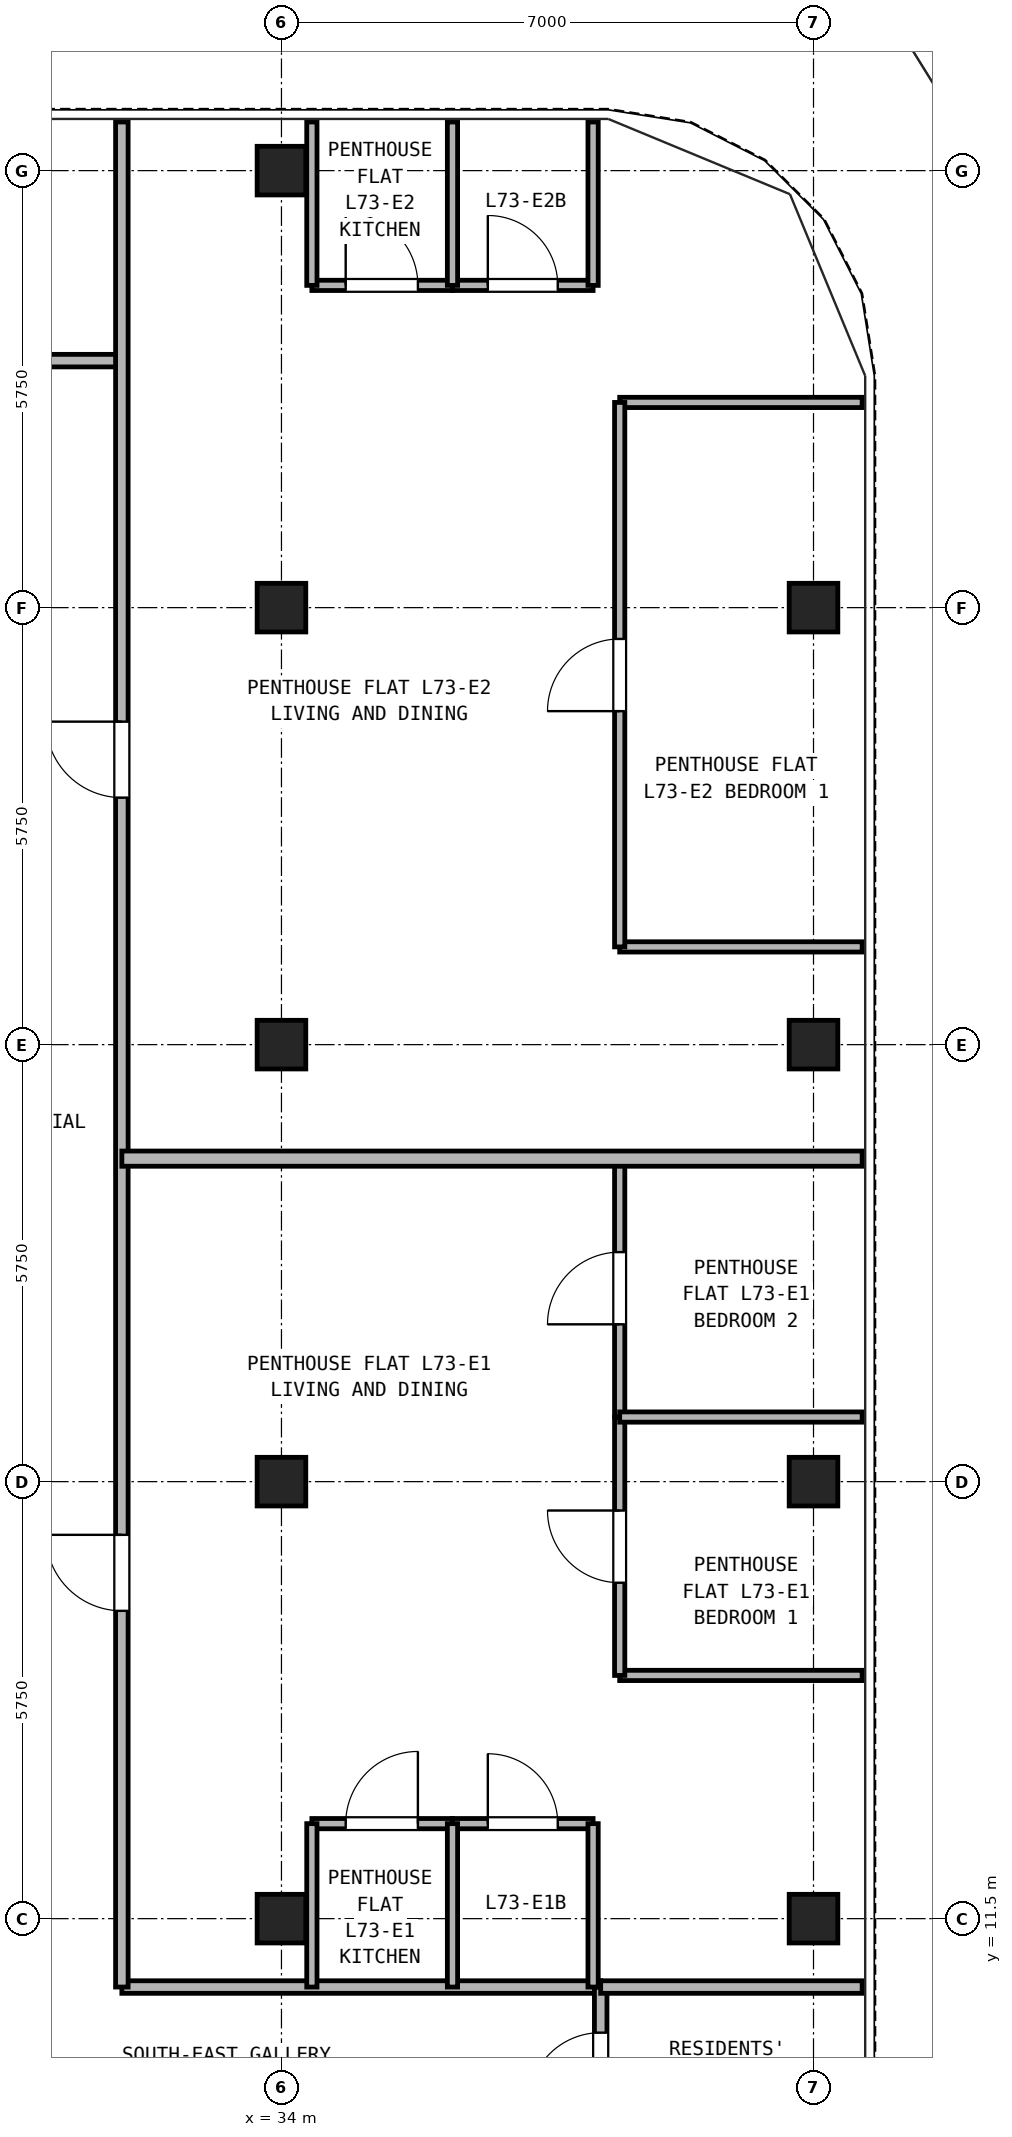
"""IFC4 building model, lengths in metres.
Left out: names, types, materials, properties, quantities, classifications, styles, units other than length and angle.
Written with IfcOpenShell. Run it as: python <this file> out.ifc"""

import sys

from ifc_helpers import new_model, si_unit, direction, frame, frame_2d, origin, origin_2d, place, context, subcontext, project, spatial, rectangle, hollow_rectangle, extrude, source, transform, mapped, element, fill, save


model = new_model("IFC4")
c1 = context("Model", 3, precision=1e-05, world=origin(), true_north=direction((0.0, 1.0)))
c2 = subcontext(c1, "Body", "Model", "MODEL_VIEW")
j1 = project(units=[si_unit("LENGTHUNIT", "METRE"), si_unit("PLANEANGLEUNIT", "RADIAN")], contexts=[c1])
p1 = place(None, origin())
s1 = spatial("IfcSite", under=j1, at=p1, CompositionType="ELEMENT")
p2 = place(p1, origin())
s2 = spatial("IfcBuilding", under=s1, at=p2, CompositionType="ELEMENT")
p3 = place(p2, frame((0.0, 0.0, 255.3)))
s3 = spatial("IfcBuildingStorey", under=s2, at=p3, CompositionType="ELEMENT", Elevation=255.3)
m1 = source(origin(), c2, "Body", "SweptSolid", [
    extrude(hollow_rectangle(XDim=0.64, YDim=0.64, WallThickness=0.035, at=origin_2d()), origin(), (0.0, 0.0, 1.0), 2.98),
])
for number, where, z_axis, x_axis in (
    (1, (34.0, 34.5, 0.0), (0.0, 0.0, 1.0), (1.0, 0.0, 0.0)),
    (2, (41.0, 11.5, 0.0), (0.0, 0.0, 1.0), (1.0, 0.0, 0.0)),
    (3, (41.0, 17.25, 0.0), (0.0, 0.0, 1.0), (1.0, 0.0, 0.0)),
    (4, (41.0, 23.0, 0.0), (0.0, 0.0, 1.0), (1.0, 0.0, 0.0)),
    (5, (41.0, 28.75, 0.0), (0.0, 0.0, 1.0), (1.0, 0.0, 0.0)),
    (6, (34.0, 11.5, 0.0), (0.0, 0.0, 1.0), (1.0, 0.0, 0.0)),
    (7, (34.0, 17.25, 0.0), (0.0, 0.0, 1.0), (1.0, 0.0, 0.0)),
    (8, (34.0, 23.0, 0.0), (0.0, 0.0, 1.0), (1.0, 0.0, 0.0)),
    (9, (34.0, 28.75, 0.0), (0.0, 0.0, 1.0), (1.0, 0.0, 0.0)),
):
    element("IfcColumn", number, at=place(p3, frame(where, z_axis=z_axis, x_axis=x_axis)), inside=s3, PredefinedType="COLUMN", context=c2, shape_type="MappedRepresentation", body=[
        mapped(m1, transform((0.0, 0.0, 0.0), x_axis=(1.0, 0.0, 0.0), y_axis=(0.0, 1.0, 0.0), z_axis=(0.0, 0.0, 1.0), scale=1.0)),
    ])
p4 = place(p3, frame((31.9, 10.6, 0.0), z_axis=(0.0, 0.0, 1.0), x_axis=(1.0, 0.0, 0.0)))
e10 = element("IfcWall", 10, at=p4, inside=s3, PredefinedType="PARTITIONING", context=c2, shape_type="SweptSolid", body=[
    extrude(rectangle(XDim=6.3, YDim=0.165, at=frame_2d((3.15, 0.0))), origin(), (0.0, 0.0, 1.0), 2.98),
])
p5 = place(p3, frame((38.2, 8.6, 0.0), z_axis=(0.0, 0.0, 1.0), x_axis=(0.0, 1.0, 0.0)))
e11 = element("IfcWall", 11, at=p5, inside=s3, PredefinedType="PARTITIONING", context=c2, shape_type="SweptSolid", body=[
    extrude(rectangle(XDim=2.0, YDim=0.165, at=frame_2d((1.0, 0.0))), origin(), (0.0, 0.0, 1.0), 2.98),
])
p6 = place(p5, frame((0.45, 0.0, 0.0)))
e12 = element("IfcOpeningElement", 12, at=p6, cuts=e11, PredefinedType="OPENING", context=c2, shape_type="SweptSolid", body=[
    extrude(rectangle(XDim=0.95, YDim=2.15, at=frame_2d((0.475, 1.075))), frame((0.0, 0.093, 0.0), z_axis=(0.0, -1.0, 0.0), x_axis=(1.0, 0.0, 0.0)), (0.0, 0.0, 1.0), 0.185),
])
p7 = place(p3, frame((15.1, 32.0, 0.0), z_axis=(0.0, 0.0, 1.0), x_axis=(1.0, 0.0, 0.0)))
e13 = element("IfcWall", 13, at=p7, inside=s3, PredefinedType="PARTITIONING", context=c2, shape_type="SweptSolid", body=[
    extrude(rectangle(XDim=16.8, YDim=0.165, at=frame_2d((8.4, 0.0))), origin(), (0.0, 0.0, 1.0), 2.98),
])
p8 = place(p7, frame((2.7, 0.0, 0.0)))
e14 = element("IfcOpeningElement", 14, at=p8, cuts=e13, PredefinedType="OPENING", context=c2, shape_type="SweptSolid", body=[
    extrude(rectangle(XDim=0.95, YDim=2.15, at=frame_2d((0.475, 1.075))), frame((0.0, 0.093, 0.0), z_axis=(0.0, -1.0, 0.0), x_axis=(1.0, 0.0, 0.0)), (0.0, 0.0, 1.0), 0.185),
])
p9 = place(p7, frame((8.1, 0.0, 0.0)))
e15 = element("IfcOpeningElement", 15, at=p9, cuts=e13, PredefinedType="OPENING", context=c2, shape_type="SweptSolid", body=[
    extrude(rectangle(XDim=0.95, YDim=2.15, at=frame_2d((0.475, 1.075))), frame((0.0, 0.093, 0.0), z_axis=(0.0, -1.0, 0.0), x_axis=(1.0, 0.0, 0.0)), (0.0, 0.0, 1.0), 0.185),
])
p10 = place(p7, frame((13.3, 0.0, 0.0)))
e16 = element("IfcOpeningElement", 16, at=p10, cuts=e13, PredefinedType="OPENING", context=c2, shape_type="SweptSolid", body=[
    extrude(rectangle(XDim=0.92, YDim=2.1, at=frame_2d((0.46, 1.05))), frame((0.0, 0.093, 0.0), z_axis=(0.0, -1.0, 0.0), x_axis=(1.0, 0.0, 0.0)), (0.0, 0.0, 1.0), 0.185),
])
p11 = place(p3, frame((31.9, 10.6, 0.0), z_axis=(0.0, 0.0, 1.0), x_axis=(0.0, 1.0, 0.0)))
e17 = element("IfcWall", 17, at=p11, inside=s3, PredefinedType="PARTITIONING", context=c2, shape_type="SweptSolid", body=[
    extrude(rectangle(XDim=24.54, YDim=0.165, at=frame_2d((12.27, 0.0))), origin(), (0.0, 0.0, 1.0), 2.98),
])
p12 = place(p11, frame((4.95, 0.0, 0.0)))
e18 = element("IfcOpeningElement", 18, at=p12, cuts=e17, PredefinedType="OPENING", context=c2, shape_type="SweptSolid", body=[
    extrude(rectangle(XDim=1.0, YDim=2.15, at=frame_2d((0.5, 1.075))), frame((0.0, 0.093, 0.0), z_axis=(0.0, -1.0, 0.0), x_axis=(1.0, 0.0, 0.0)), (0.0, 0.0, 1.0), 0.185),
])
p13 = place(p11, frame((15.65, 0.0, 0.0)))
e19 = element("IfcOpeningElement", 19, at=p13, cuts=e17, PredefinedType="OPENING", context=c2, shape_type="SweptSolid", body=[
    extrude(rectangle(XDim=1.0, YDim=2.15, at=frame_2d((0.5, 1.075))), frame((0.0, 0.093, 0.0), z_axis=(0.0, -1.0, 0.0), x_axis=(1.0, 0.0, 0.0)), (0.0, 0.0, 1.0), 0.185),
])
p14 = place(p3, frame((38.2, 10.6, 0.0), z_axis=(0.0, 0.0, 1.0), x_axis=(1.0, 0.0, 0.0)))
e20 = element("IfcWall", 20, at=p14, inside=s3, PredefinedType="PARTITIONING", context=c2, shape_type="SweptSolid", body=[
    extrude(rectangle(XDim=3.44, YDim=0.165, at=frame_2d((1.72, 0.0))), origin(), (0.0, 0.0, 1.0), 2.98),
])
p15 = place(p3, frame((34.4, 12.75, 0.0), z_axis=(0.0, 0.0, 1.0), x_axis=(1.0, 0.0, 0.0)))
e21 = element("IfcWall", 21, at=p15, inside=s3, PredefinedType="PARTITIONING", context=c2, shape_type="SweptSolid", body=[
    extrude(rectangle(XDim=1.85, YDim=0.135, at=frame_2d((0.925, 0.0))), origin(), (0.0, 0.0, 1.0), 2.98),
])
p16 = place(p15, frame((0.445, 0.0, 0.0)))
e22 = element("IfcOpeningElement", 22, at=p16, cuts=e21, PredefinedType="OPENING", context=c2, shape_type="SweptSolid", body=[
    extrude(rectangle(XDim=0.95, YDim=2.15, at=frame_2d((0.475, 1.075))), frame((0.0, 0.077, 0.0), z_axis=(0.0, -1.0, 0.0), x_axis=(1.0, 0.0, 0.0)), (0.0, 0.0, 1.0), 0.155),
])
p17 = place(p3, frame((36.25, 12.75, 0.0), z_axis=(0.0, 0.0, 1.0), x_axis=(1.0, 0.0, 0.0)))
e23 = element("IfcWall", 23, at=p17, inside=s3, PredefinedType="PARTITIONING", context=c2, shape_type="SweptSolid", body=[
    extrude(rectangle(XDim=1.85, YDim=0.135, at=frame_2d((0.925, 0.0))), origin(), (0.0, 0.0, 1.0), 2.98),
])
p18 = place(p17, frame((0.465, 0.0, 0.0)))
e24 = element("IfcOpeningElement", 24, at=p18, cuts=e23, PredefinedType="OPENING", context=c2, shape_type="SweptSolid", body=[
    extrude(rectangle(XDim=0.92, YDim=2.1, at=frame_2d((0.46, 1.05))), frame((0.0, 0.077, 0.0), z_axis=(0.0, -1.0, 0.0), x_axis=(1.0, 0.0, 0.0)), (0.0, 0.0, 1.0), 0.155),
])
for number, where, z_axis, x_axis in (
    (25, (34.4, 10.6, 0.0), (0.0, 0.0, 1.0), (0.0, 1.0, 0.0)),
    (26, (36.25, 10.6, 0.0), (0.0, 0.0, 1.0), (0.0, 1.0, 0.0)),
    (27, (38.1, 10.6, 0.0), (0.0, 0.0, 1.0), (0.0, 1.0, 0.0)),
):
    element("IfcWall", number, at=place(p3, frame(where, z_axis=z_axis, x_axis=x_axis)), inside=s3, PredefinedType="PARTITIONING", context=c2, shape_type="SweptSolid", body=[
        extrude(rectangle(XDim=2.15, YDim=0.135, at=frame_2d((1.075, 0.0))), origin(), (0.0, 0.0, 1.0), 2.98),
    ])
p19 = place(p3, frame((38.45, 14.7, 0.0), z_axis=(0.0, 0.0, 1.0), x_axis=(1.0, 0.0, 0.0)))
e28 = element("IfcWall", 28, at=p19, inside=s3, PredefinedType="PARTITIONING", context=c2, shape_type="SweptSolid", body=[
    extrude(rectangle(XDim=3.19, YDim=0.135, at=frame_2d((1.595, 0.0))), origin(), (0.0, 0.0, 1.0), 2.98),
])
p20 = place(p3, frame((38.45, 14.7, 0.0), z_axis=(0.0, 0.0, 1.0), x_axis=(0.0, 1.0, 0.0)))
e29 = element("IfcWall", 29, at=p20, inside=s3, PredefinedType="PARTITIONING", context=c2, shape_type="SweptSolid", body=[
    extrude(rectangle(XDim=3.4, YDim=0.135, at=frame_2d((1.7, 0.0))), origin(), (0.0, 0.0, 1.0), 2.98),
])
p21 = place(p20, frame((1.22, 0.0, 0.0)))
e30 = element("IfcOpeningElement", 30, at=p21, cuts=e29, PredefinedType="OPENING", context=c2, shape_type="SweptSolid", body=[
    extrude(rectangle(XDim=0.95, YDim=2.15, at=frame_2d((0.475, 1.075))), frame((0.0, 0.077, 0.0), z_axis=(0.0, -1.0, 0.0), x_axis=(1.0, 0.0, 0.0)), (0.0, 0.0, 1.0), 0.155),
])
p22 = place(p3, frame((38.45, 18.1, 0.0), z_axis=(0.0, 0.0, 1.0), x_axis=(0.0, 1.0, 0.0)))
e31 = element("IfcWall", 31, at=p22, inside=s3, PredefinedType="PARTITIONING", context=c2, shape_type="SweptSolid", body=[
    extrude(rectangle(XDim=3.4, YDim=0.135, at=frame_2d((1.7, 0.0))), origin(), (0.0, 0.0, 1.0), 2.98),
])
p23 = place(p22, frame((1.22, 0.0, 0.0)))
e32 = element("IfcOpeningElement", 32, at=p23, cuts=e31, PredefinedType="OPENING", context=c2, shape_type="SweptSolid", body=[
    extrude(rectangle(XDim=0.95, YDim=2.15, at=frame_2d((0.475, 1.075))), frame((0.0, 0.077, 0.0), z_axis=(0.0, -1.0, 0.0), x_axis=(1.0, 0.0, 0.0)), (0.0, 0.0, 1.0), 0.155),
])
p24 = place(p3, frame((38.45, 18.1, 0.0), z_axis=(0.0, 0.0, 1.0), x_axis=(1.0, 0.0, 0.0)))
e33 = element("IfcWall", 33, at=p24, inside=s3, PredefinedType="PARTITIONING", context=c2, shape_type="SweptSolid", body=[
    extrude(rectangle(XDim=3.19, YDim=0.135, at=frame_2d((1.595, 0.0))), origin(), (0.0, 0.0, 1.0), 2.98),
])
p25 = place(p3, frame((31.9, 21.5, 0.0), z_axis=(0.0, 0.0, 1.0), x_axis=(1.0, 0.0, 0.0)))
e34 = element("IfcWall", 34, at=p25, inside=s3, PredefinedType="PARTITIONING", context=c2, shape_type="SweptSolid", body=[
    extrude(rectangle(XDim=9.74, YDim=0.2, at=frame_2d((4.87, 0.0))), origin(), (0.0, 0.0, 1.0), 2.98),
])
p26 = place(p3, frame((34.4, 32.99, 0.0), z_axis=(0.0, 0.0, 1.0), x_axis=(1.0, 0.0, 0.0)))
e35 = element("IfcWall", 35, at=p26, inside=s3, PredefinedType="PARTITIONING", context=c2, shape_type="SweptSolid", body=[
    extrude(rectangle(XDim=1.85, YDim=0.135, at=frame_2d((0.925, 0.0))), origin(), (0.0, 0.0, 1.0), 2.98),
])
p27 = place(p26, frame((0.445, 0.0, 0.0)))
e36 = element("IfcOpeningElement", 36, at=p27, cuts=e35, PredefinedType="OPENING", context=c2, shape_type="SweptSolid", body=[
    extrude(rectangle(XDim=0.95, YDim=2.15, at=frame_2d((0.475, 1.075))), frame((0.0, 0.077, 0.0), z_axis=(0.0, -1.0, 0.0), x_axis=(1.0, 0.0, 0.0)), (0.0, 0.0, 1.0), 0.155),
])
p28 = place(p3, frame((36.25, 32.99, 0.0), z_axis=(0.0, 0.0, 1.0), x_axis=(1.0, 0.0, 0.0)))
e37 = element("IfcWall", 37, at=p28, inside=s3, PredefinedType="PARTITIONING", context=c2, shape_type="SweptSolid", body=[
    extrude(rectangle(XDim=1.85, YDim=0.135, at=frame_2d((0.925, 0.0))), origin(), (0.0, 0.0, 1.0), 2.98),
])
p29 = place(p28, frame((0.465, 0.0, 0.0)))
e38 = element("IfcOpeningElement", 38, at=p29, cuts=e37, PredefinedType="OPENING", context=c2, shape_type="SweptSolid", body=[
    extrude(rectangle(XDim=0.92, YDim=2.1, at=frame_2d((0.46, 1.05))), frame((0.0, 0.077, 0.0), z_axis=(0.0, -1.0, 0.0), x_axis=(1.0, 0.0, 0.0)), (0.0, 0.0, 1.0), 0.155),
])
for number, where, z_axis, x_axis in (
    (39, (34.4, 32.99, 0.0), (0.0, 0.0, 1.0), (0.0, 1.0, 0.0)),
    (40, (36.25, 32.99, 0.0), (0.0, 0.0, 1.0), (0.0, 1.0, 0.0)),
    (41, (38.1, 32.99, 0.0), (0.0, 0.0, 1.0), (0.0, 1.0, 0.0)),
):
    element("IfcWall", number, at=place(p3, frame(where, z_axis=z_axis, x_axis=x_axis)), inside=s3, PredefinedType="PARTITIONING", context=c2, shape_type="SweptSolid", body=[
        extrude(rectangle(XDim=2.15, YDim=0.135, at=frame_2d((1.075, 0.0))), origin(), (0.0, 0.0, 1.0), 2.98),
    ])
for number, where, z_axis, x_axis in (
    (42, (38.45, 24.286, 0.0), (0.0, 0.0, 1.0), (1.0, 0.0, 0.0)),
    (43, (38.45, 31.45, 0.0), (0.0, 0.0, 1.0), (1.0, 0.0, 0.0)),
):
    element("IfcWall", number, at=place(p3, frame(where, z_axis=z_axis, x_axis=x_axis)), inside=s3, PredefinedType="PARTITIONING", context=c2, shape_type="SweptSolid", body=[
        extrude(rectangle(XDim=3.19, YDim=0.135, at=frame_2d((1.595, 0.0))), origin(), (0.0, 0.0, 1.0), 2.98),
    ])
p30 = place(p3, frame((38.45, 24.286, 0.0), z_axis=(0.0, 0.0, 1.0), x_axis=(0.0, 1.0, 0.0)))
e44 = element("IfcWall", 44, at=p30, inside=s3, PredefinedType="PARTITIONING", context=c2, shape_type="SweptSolid", body=[
    extrude(rectangle(XDim=7.164, YDim=0.135, at=frame_2d((3.582, 0.0))), origin(), (0.0, 0.0, 1.0), 2.98),
])
p31 = place(p30, frame((3.102, 0.0, 0.0)))
e45 = element("IfcOpeningElement", 45, at=p31, cuts=e44, PredefinedType="OPENING", context=c2, shape_type="SweptSolid", body=[
    extrude(rectangle(XDim=0.95, YDim=2.15, at=frame_2d((0.475, 1.075))), frame((0.0, 0.077, 0.0), z_axis=(0.0, -1.0, 0.0), x_axis=(1.0, 0.0, 0.0)), (0.0, 0.0, 1.0), 0.155),
])
p32 = place(p6, origin())
e46 = element("IfcDoor", 46, at=p32, inside=s3, OperationType="SINGLE_SWING_LEFT", PredefinedType="DOOR", context=c2, shape_type="SweptSolid", body=[
    extrude(rectangle(XDim=0.95, YDim=2.15, at=frame_2d((0.475, 1.075))), frame((0.0, 0.025, 0.0), z_axis=(0.0, -1.0, 0.0), x_axis=(1.0, 0.0, 0.0)), (0.0, 0.0, 1.0), 0.05),
])
fill(e12, e46)
p33 = place(p16, origin())
e47 = element("IfcDoor", 47, at=p33, inside=s3, OperationType="SINGLE_SWING_RIGHT", PredefinedType="DOOR", context=c2, shape_type="SweptSolid", body=[
    extrude(rectangle(XDim=0.95, YDim=2.15, at=frame_2d((0.475, 1.075))), frame((0.0, 0.025, 0.0), z_axis=(0.0, -1.0, 0.0), x_axis=(1.0, 0.0, 0.0)), (0.0, 0.0, 1.0), 0.05),
])
fill(e22, e47)
p34 = place(p18, origin())
e48 = element("IfcDoor", 48, at=p34, inside=s3, OperationType="SINGLE_SWING_LEFT", PredefinedType="DOOR", context=c2, shape_type="SweptSolid", body=[
    extrude(rectangle(XDim=0.92, YDim=2.1, at=frame_2d((0.46, 1.05))), frame((0.0, 0.025, 0.0), z_axis=(0.0, -1.0, 0.0), x_axis=(1.0, 0.0, 0.0)), (0.0, 0.0, 1.0), 0.05),
])
fill(e24, e48)
p35 = place(p21, frame((0.95, 0.0, 0.0), z_axis=(0.0, 0.0, 1.0), x_axis=(-1.0, 0.0, 0.0)))
e49 = element("IfcDoor", 49, at=p35, inside=s3, OperationType="SINGLE_SWING_RIGHT", PredefinedType="DOOR", context=c2, shape_type="SweptSolid", body=[
    extrude(rectangle(XDim=0.95, YDim=2.15, at=frame_2d((0.475, 1.075))), frame((0.0, 0.025, 0.0), z_axis=(0.0, -1.0, 0.0), x_axis=(1.0, 0.0, 0.0)), (0.0, 0.0, 1.0), 0.05),
])
fill(e30, e49)
p36 = place(p23, frame((0.95, 0.0, 0.0), z_axis=(0.0, 0.0, 1.0), x_axis=(-1.0, 0.0, 0.0)))
e50 = element("IfcDoor", 50, at=p36, inside=s3, OperationType="SINGLE_SWING_LEFT", PredefinedType="DOOR", context=c2, shape_type="SweptSolid", body=[
    extrude(rectangle(XDim=0.95, YDim=2.15, at=frame_2d((0.475, 1.075))), frame((0.0, 0.025, 0.0), z_axis=(0.0, -1.0, 0.0), x_axis=(1.0, 0.0, 0.0)), (0.0, 0.0, 1.0), 0.05),
])
fill(e32, e50)
p37 = place(p12, frame((1.0, 0.0, 0.0), z_axis=(0.0, 0.0, 1.0), x_axis=(-1.0, 0.0, 0.0)))
e51 = element("IfcDoor", 51, at=p37, inside=s3, OperationType="SINGLE_SWING_RIGHT", PredefinedType="DOOR", context=c2, shape_type="SweptSolid", body=[
    extrude(rectangle(XDim=1.0, YDim=2.15, at=frame_2d((0.5, 1.075))), frame((0.0, 0.025, 0.0), z_axis=(0.0, -1.0, 0.0), x_axis=(1.0, 0.0, 0.0)), (0.0, 0.0, 1.0), 0.05),
])
fill(e18, e51)
p38 = place(p27, frame((0.95, 0.0, 0.0), z_axis=(0.0, 0.0, 1.0), x_axis=(-1.0, 0.0, 0.0)))
e52 = element("IfcDoor", 52, at=p38, inside=s3, OperationType="SINGLE_SWING_LEFT", PredefinedType="DOOR", context=c2, shape_type="SweptSolid", body=[
    extrude(rectangle(XDim=0.95, YDim=2.15, at=frame_2d((0.475, 1.075))), frame((0.0, 0.025, 0.0), z_axis=(0.0, -1.0, 0.0), x_axis=(1.0, 0.0, 0.0)), (0.0, 0.0, 1.0), 0.05),
])
fill(e36, e52)
p39 = place(p29, frame((0.92, 0.0, 0.0), z_axis=(0.0, 0.0, 1.0), x_axis=(-1.0, 0.0, 0.0)))
e53 = element("IfcDoor", 53, at=p39, inside=s3, OperationType="SINGLE_SWING_LEFT", PredefinedType="DOOR", context=c2, shape_type="SweptSolid", body=[
    extrude(rectangle(XDim=0.92, YDim=2.1, at=frame_2d((0.46, 1.05))), frame((0.0, 0.025, 0.0), z_axis=(0.0, -1.0, 0.0), x_axis=(1.0, 0.0, 0.0)), (0.0, 0.0, 1.0), 0.05),
])
fill(e38, e53)
p40 = place(p31, frame((0.95, 0.0, 0.0), z_axis=(0.0, 0.0, 1.0), x_axis=(-1.0, 0.0, 0.0)))
e54 = element("IfcDoor", 54, at=p40, inside=s3, OperationType="SINGLE_SWING_LEFT", PredefinedType="DOOR", context=c2, shape_type="SweptSolid", body=[
    extrude(rectangle(XDim=0.95, YDim=2.15, at=frame_2d((0.475, 1.075))), frame((0.0, 0.025, 0.0), z_axis=(0.0, -1.0, 0.0), x_axis=(1.0, 0.0, 0.0)), (0.0, 0.0, 1.0), 0.05),
])
fill(e45, e54)
p41 = place(p13, frame((1.0, 0.0, 0.0), z_axis=(0.0, 0.0, 1.0), x_axis=(-1.0, 0.0, 0.0)))
e55 = element("IfcDoor", 55, at=p41, inside=s3, OperationType="SINGLE_SWING_RIGHT", PredefinedType="DOOR", context=c2, shape_type="SweptSolid", body=[
    extrude(rectangle(XDim=1.0, YDim=2.15, at=frame_2d((0.5, 1.075))), frame((0.0, 0.025, 0.0), z_axis=(0.0, -1.0, 0.0), x_axis=(1.0, 0.0, 0.0)), (0.0, 0.0, 1.0), 0.05),
])
fill(e19, e55)
save(model, sys.argv[1])
